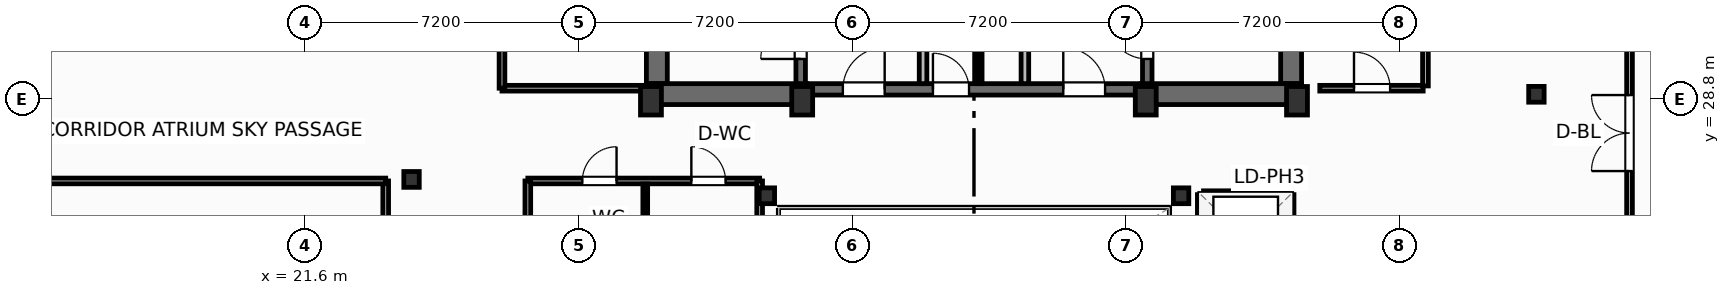
"""IFC4 building model, lengths in metres.
Left out: names, types, materials, properties, quantities, classifications, styles, units other than length and angle.
Written with IfcOpenShell. Run it as: python <this file> out.ifc"""

import sys

from ifc_helpers import new_model, si_unit, direction, frame, frame_2d, origin, origin_2d, place, context, subcontext, project, spatial, rectangle, i_section, extrude, element, fill, save


model = new_model("IFC4")
c1 = context("Model", 3, precision=1e-05, world=origin(), true_north=direction((0.0, 1.0)))
c2 = subcontext(c1, "Body", "Model", "MODEL_VIEW")
j1 = project(units=[si_unit("LENGTHUNIT", "METRE"), si_unit("PLANEANGLEUNIT", "RADIAN")], contexts=[c1])
p1 = place(None, origin())
s1 = spatial("IfcSite", under=j1, at=p1, CompositionType="ELEMENT")
p2 = place(p1, origin())
s2 = spatial("IfcBuilding", under=s1, at=p2, CompositionType="ELEMENT")
p3 = place(p2, frame((0.0, 0.0, 291.5)))
s3 = spatial("IfcBuildingStorey", under=s2, at=p3, CompositionType="ELEMENT", Elevation=291.5)
for number, where, z_axis, x_axis in (
    (1, (30.7, 28.75, 0.0), (0.0, 0.0, 1.0), (1.0, 0.0, 0.0)),
    (2, (34.68, 28.75, 0.0), (0.0, 0.0, 1.0), (1.0, 0.0, 0.0)),
    (3, (43.72, 28.75, 0.0), (0.0, 0.0, 1.0), (1.0, 0.0, 0.0)),
    (4, (47.7, 28.75, 0.0), (0.0, 0.0, 1.0), (1.0, 0.0, 0.0)),
):
    element("IfcColumn", number, at=place(p3, frame(where, z_axis=z_axis, x_axis=x_axis)), inside=s3, PredefinedType="COLUMN", context=c2, shape_type="SweptSolid", body=[
        extrude(rectangle(XDim=0.55, YDim=0.75, at=origin_2d()), origin(), (0.0, 0.0, 1.0), 4.8),
    ])
for number, where, z_axis, x_axis in (
    (5, (33.75, 26.25, 0.0), (0.0, 0.0, 1.0), (1.0, 0.0, 0.0)),
    (6, (44.65, 26.25, 0.0), (0.0, 0.0, 1.0), (1.0, 0.0, 0.0)),
    (7, (24.4, 26.68, 0.0), (0.0, 0.0, 1.0), (1.0, 0.0, 0.0)),
    (8, (54.0, 28.92, 0.0), (0.0, 0.0, 1.0), (1.0, 0.0, 0.0)),
):
    element("IfcColumn", number, at=place(p3, frame(where, z_axis=z_axis, x_axis=x_axis)), inside=s3, PredefinedType="COLUMN", context=c2, shape_type="SweptSolid", body=[
        extrude(i_section(OverallWidth=0.406, OverallDepth=0.416, WebThickness=0.03, FlangeThickness=0.048, FilletRadius=0.025, at=origin_2d()), origin(), (0.0, 0.0, 1.0), 4.8),
    ])
for number, where, z_axis, x_axis in (
    (9, (30.855, 29.2, 0.0), (0.0, 0.0, 1.0), (0.0, 1.0, 0.0)),
    (10, (47.545, 29.2, 0.0), (0.0, 0.0, 1.0), (0.0, 1.0, 0.0)),
):
    element("IfcWall", number, at=place(p3, frame(where, z_axis=z_axis, x_axis=x_axis)), inside=s3, PredefinedType="SHEAR", context=c2, shape_type="SweptSolid", body=[
        extrude(rectangle(XDim=9.22, YDim=0.55, at=frame_2d((4.61, 0.0))), origin(), (0.0, 0.0, 1.0), 4.48),
    ])
for number, where, z_axis, x_axis in (
    (11, (30.58, 28.925, 0.0), (0.0, 0.0, 1.0), (1.0, 0.0, 0.0)),
    (12, (43.6, 28.925, 0.0), (0.0, 0.0, 1.0), (1.0, 0.0, 0.0)),
):
    element("IfcWall", number, at=place(p3, frame(where, z_axis=z_axis, x_axis=x_axis)), inside=s3, PredefinedType="SHEAR", context=c2, shape_type="SweptSolid", body=[
        extrude(rectangle(XDim=4.22, YDim=0.55, at=frame_2d((2.11, 0.0))), origin(), (0.0, 0.0, 1.0), 4.48),
    ])
p4 = place(p3, frame((34.8, 29.05, 0.0), z_axis=(0.0, 0.0, 1.0), x_axis=(1.0, 0.0, 0.0)))
e13 = element("IfcWall", 13, at=p4, inside=s3, PredefinedType="SHEAR", context=c2, shape_type="SweptSolid", body=[
    extrude(rectangle(XDim=8.8, YDim=0.3, at=frame_2d((4.4, 0.0))), origin(), (0.0, 0.0, 1.0), 4.48),
])
p5 = place(p4, frame((0.95, 0.0, 0.0)))
e14 = element("IfcOpeningElement", 14, at=p5, cuts=e13, PredefinedType="OPENING", context=c2, shape_type="SweptSolid", body=[
    extrude(rectangle(XDim=1.1, YDim=2.15, at=frame_2d((0.55, 1.075))), frame((0.0, 0.16, 0.0), z_axis=(0.0, -1.0, 0.0), x_axis=(1.0, 0.0, 0.0)), (0.0, 0.0, 1.0), 0.32),
])
p6 = place(p4, frame((6.75, 0.0, 0.0)))
e15 = element("IfcOpeningElement", 15, at=p6, cuts=e13, PredefinedType="OPENING", context=c2, shape_type="SweptSolid", body=[
    extrude(rectangle(XDim=1.1, YDim=2.15, at=frame_2d((0.55, 1.075))), frame((0.0, 0.16, 0.0), z_axis=(0.0, -1.0, 0.0), x_axis=(1.0, 0.0, 0.0)), (0.0, 0.0, 1.0), 0.32),
])
p7 = place(p4, frame((3.32, 0.0, 0.0)))
e16 = element("IfcOpeningElement", 16, at=p7, cuts=e13, PredefinedType="OPENING", context=c2, shape_type="SweptSolid", body=[
    extrude(rectangle(XDim=0.95, YDim=2.15, at=frame_2d((0.475, 1.075))), frame((0.0, 0.16, 0.0), z_axis=(0.0, -1.0, 0.0), x_axis=(1.0, 0.0, 0.0)), (0.0, 0.0, 1.0), 0.32),
])
p8 = place(p3, frame((34.64, 29.2, 0.0), z_axis=(0.0, 0.0, 1.0), x_axis=(0.0, 1.0, 0.0)))
e17 = element("IfcWall", 17, at=p8, inside=s3, PredefinedType="SHEAR", context=c2, shape_type="SweptSolid", body=[
    extrude(rectangle(XDim=9.22, YDim=0.25, at=frame_2d((4.61, 0.0))), origin(), (0.0, 0.0, 1.0), 4.48),
])
p9 = place(p8, frame((0.65, 0.0, 0.0)))
e18 = element("IfcOpeningElement", 18, at=p9, cuts=e17, PredefinedType="OPENING", context=c2, shape_type="SweptSolid", body=[
    extrude(rectangle(XDim=1.05, YDim=2.15, at=frame_2d((0.525, 1.075))), frame((0.0, 0.135, 0.0), z_axis=(0.0, -1.0, 0.0), x_axis=(1.0, 0.0, 0.0)), (0.0, 0.0, 1.0), 0.27),
])
p10 = place(p3, frame((43.76, 29.2, 0.0), z_axis=(0.0, 0.0, 1.0), x_axis=(0.0, 1.0, 0.0)))
e19 = element("IfcWall", 19, at=p10, inside=s3, PredefinedType="SHEAR", context=c2, shape_type="SweptSolid", body=[
    extrude(rectangle(XDim=9.22, YDim=0.25, at=frame_2d((4.61, 0.0))), origin(), (0.0, 0.0, 1.0), 4.48),
])
p11 = place(p10, frame((0.65, 0.0, 0.0)))
e20 = element("IfcOpeningElement", 20, at=p11, cuts=e19, PredefinedType="OPENING", context=c2, shape_type="SweptSolid", body=[
    extrude(rectangle(XDim=1.05, YDim=2.15, at=frame_2d((0.525, 1.075))), frame((0.0, 0.135, 0.0), z_axis=(0.0, -1.0, 0.0), x_axis=(1.0, 0.0, 0.0)), (0.0, 0.0, 1.0), 0.27),
])
p12 = place(p3, frame((27.693, -7.489, 0.0), z_axis=(0.0, 0.0, 1.0), x_axis=(0.733009701217, 0.680218184057, 0.0)))
e21 = element("IfcWall", 21, at=p12, inside=s3, PredefinedType="SOLIDWALL", context=c2, shape_type="SweptSolid", body=[
    extrude(rectangle(XDim=66.428, YDim=0.22, at=frame_2d((33.214, 0.0))), origin(), (0.0, 0.0, 1.0), 2.265),
])
p13 = place(p12, frame((32.014, 0.0, 0.8)))
e22 = element("IfcOpeningElement", 22, at=p13, cuts=e21, PredefinedType="OPENING", context=c2, shape_type="SweptSolid", body=[
    extrude(rectangle(XDim=2.4, YDim=1.385, at=frame_2d((1.2, 0.692))), frame((0.0, 0.12, 0.0), z_axis=(0.0, -1.0, 0.0), x_axis=(1.0, 0.0, 0.0)), (0.0, 0.0, 1.0), 0.24),
])
p14 = place(p3, frame((50.695, 58.086, 0.0), z_axis=(0.0, 0.0, 1.0), x_axis=(-0.823531024939, -0.567271232272, 0.0)))
e23 = element("IfcWall", 23, at=p14, inside=s3, PredefinedType="SOLIDWALL", context=c2, shape_type="SweptSolid", body=[
    extrude(rectangle(XDim=56.157, YDim=0.22, at=frame_2d((28.079, 0.0))), origin(), (0.0, 0.0, 1.0), 3.76),
])
p15 = place(p14, frame((26.879, 0.0, 0.8)))
e24 = element("IfcOpeningElement", 24, at=p15, cuts=e23, PredefinedType="OPENING", context=c2, shape_type="SweptSolid", body=[
    extrude(rectangle(XDim=2.4, YDim=1.85, at=frame_2d((1.2, 0.925))), frame((0.0, 0.12, 0.0), z_axis=(0.0, -1.0, 0.0), x_axis=(1.0, 0.0, 0.0)), (0.0, 0.0, 1.0), 0.24),
])
p16 = place(p3, frame((27.46, 26.64, 0.0), z_axis=(0.0, 0.0, 1.0), x_axis=(1.0, 0.0, 0.0)))
e25 = element("IfcWall", 25, at=p16, inside=s3, PredefinedType="PARTITIONING", context=c2, shape_type="SweptSolid", body=[
    extrude(rectangle(XDim=6.1, YDim=0.15, at=frame_2d((3.05, 0.0))), origin(), (0.0, 0.0, 1.0), 3.692),
])
p17 = place(p16, frame((4.303, 0.0, 0.0)))
e26 = element("IfcOpeningElement", 26, at=p17, cuts=e25, PredefinedType="OPENING", context=c2, shape_type="SweptSolid", body=[
    extrude(rectangle(XDim=0.9, YDim=2.05, at=frame_2d((0.45, 1.025))), frame((0.0, 0.085, 0.0), z_axis=(0.0, -1.0, 0.0), x_axis=(1.0, 0.0, 0.0)), (0.0, 0.0, 1.0), 0.17),
])
p18 = place(p16, frame((1.435, 0.0, 0.0)))
e27 = element("IfcOpeningElement", 27, at=p18, cuts=e25, PredefinedType="OPENING", context=c2, shape_type="SweptSolid", body=[
    extrude(rectangle(XDim=0.9, YDim=2.05, at=frame_2d((0.45, 1.025))), frame((0.0, 0.085, 0.0), z_axis=(0.0, -1.0, 0.0), x_axis=(1.0, 0.0, 0.0)), (0.0, 0.0, 1.0), 0.17),
])
p19 = place(p3, frame((30.55, 19.38, 0.0), z_axis=(0.0, 0.0, 1.0), x_axis=(0.0, 1.0, 0.0)))
e28 = element("IfcWall", 28, at=p19, inside=s3, PredefinedType="PARTITIONING", context=c2, shape_type="SweptSolid", body=[
    extrude(rectangle(XDim=7.18, YDim=0.125, at=frame_2d((3.59, 0.0))), origin(), (0.0, 0.0, 1.0), 4.48),
])
p20 = place(p3, frame((27.46, 19.3, 0.0), z_axis=(0.0, 0.0, 1.0), x_axis=(0.0, 1.0, 0.0)))
e29 = element("IfcWall", 29, at=p20, inside=s3, PredefinedType="PARTITIONING", context=c2, shape_type="SweptSolid", body=[
    extrude(rectangle(XDim=7.34, YDim=0.15, at=frame_2d((3.67, 0.0))), origin(), (0.0, 0.0, 1.0), 4.48),
])
p21 = place(p3, frame((33.56, 19.3, 0.0), z_axis=(0.0, 0.0, 1.0), x_axis=(0.0, 1.0, 0.0)))
e30 = element("IfcWall", 30, at=p21, inside=s3, PredefinedType="PARTITIONING", context=c2, shape_type="SweptSolid", body=[
    extrude(rectangle(XDim=7.34, YDim=0.15, at=frame_2d((3.67, 0.0))), origin(), (0.0, 0.0, 1.0), 2.265),
])
p22 = place(p3, frame((56.45, 19.3, 0.0), z_axis=(0.0, 0.0, 1.0), x_axis=(0.0, 1.0, 0.0)))
e31 = element("IfcWall", 31, at=p22, inside=s3, PredefinedType="PARTITIONING", context=c2, shape_type="SweptSolid", body=[
    extrude(rectangle(XDim=32.7, YDim=0.15, at=frame_2d((16.35, 0.0))), origin(), (0.0, 0.0, 1.0), 2.265),
])
p23 = place(p22, frame((7.6, 0.0, 0.0)))
e32 = element("IfcOpeningElement", 32, at=p23, cuts=e31, PredefinedType="OPENING", context=c2, shape_type="SweptSolid", body=[
    extrude(rectangle(XDim=2.0, YDim=2.05, at=frame_2d((1.0, 1.025))), frame((0.0, 0.085, 0.0), z_axis=(0.0, -1.0, 0.0), x_axis=(1.0, 0.0, 0.0)), (0.0, 0.0, 1.0), 0.17),
])
p24 = place(p3, frame((23.72, 19.3, 0.0), z_axis=(0.0, 0.0, 1.0), x_axis=(0.0, 1.0, 0.0)))
e33 = element("IfcWall", 33, at=p24, inside=s3, PredefinedType="PARTITIONING", context=c2, shape_type="SweptSolid", body=[
    extrude(rectangle(XDim=7.34, YDim=0.15, at=frame_2d((3.67, 0.0))), origin(), (0.0, 0.0, 1.0), 4.48),
])
p25 = place(p3, frame((5.078, 26.64, 0.0), z_axis=(0.0, 0.0, 1.0), x_axis=(1.0, 0.0, 0.0)))
e34 = element("IfcWall", 34, at=p25, inside=s3, PredefinedType="PARTITIONING", context=c2, shape_type="SweptSolid", body=[
    extrude(rectangle(XDim=18.642, YDim=0.15, at=frame_2d((9.321, 0.0))), origin(), (0.0, 0.0, 1.0), 2.265),
])
for number, where, z_axis, x_axis in (
    (35, (37.86, 29.2, 0.0), (0.0, 0.0, 1.0), (0.0, 1.0, 0.0)),
    (36, (40.54, 29.2, 0.0), (0.0, 0.0, 1.0), (0.0, 1.0, 0.0)),
):
    element("IfcWall", number, at=place(p3, frame(where, z_axis=z_axis, x_axis=x_axis)), inside=s3, PredefinedType="PARTITIONING", context=c2, shape_type="SweptSolid", body=[
        extrude(rectangle(XDim=5.18, YDim=0.2, at=frame_2d((2.59, 0.0))), origin(), (0.0, 0.0, 1.0), 4.48),
    ])
p26 = place(p3, frame((39.35, 29.2, 0.0), z_axis=(0.0, 0.0, 1.0), x_axis=(0.0, 1.0, 0.0)))
e37 = element("IfcWall", 37, at=p26, inside=s3, PredefinedType="PARTITIONING", context=c2, shape_type="SweptSolid", body=[
    extrude(rectangle(XDim=5.22, YDim=0.125, at=frame_2d((2.61, 0.0))), origin(), (0.0, 0.0, 1.0), 4.48),
])
p27 = place(p26, frame((2.05, 0.0, 0.0)))
e38 = element("IfcOpeningElement", 38, at=p27, cuts=e37, PredefinedType="OPENING", context=c2, shape_type="SweptSolid", body=[
    extrude(rectangle(XDim=0.85, YDim=2.05, at=frame_2d((0.425, 1.025))), frame((0.0, 0.073, 0.0), z_axis=(0.0, -1.0, 0.0), x_axis=(1.0, 0.0, 0.0)), (0.0, 0.0, 1.0), 0.145),
])
p28 = place(p3, frame((26.78, 29.08, 0.0), z_axis=(0.0, 0.0, 1.0), x_axis=(1.0, 0.0, 0.0)))
e39 = element("IfcWall", 39, at=p28, inside=s3, PredefinedType="PARTITIONING", context=c2, shape_type="SweptSolid", body=[
    extrude(rectangle(XDim=3.8, YDim=0.15, at=frame_2d((1.9, 0.0))), origin(), (0.0, 0.0, 1.0), 4.48),
])
p29 = place(p3, frame((26.78, 29.08, 0.0), z_axis=(0.0, 0.0, 1.0), x_axis=(0.0, 1.0, 0.0)))
e40 = element("IfcWall", 40, at=p29, inside=s3, PredefinedType="PARTITIONING", context=c2, shape_type="SweptSolid", body=[
    extrude(rectangle(XDim=9.18, YDim=0.15, at=frame_2d((4.59, 0.0))), origin(), (0.0, 0.0, 1.0), 4.48),
])
p30 = place(p29, frame((2.4, 0.0, 0.0)))
e41 = element("IfcOpeningElement", 41, at=p30, cuts=e40, PredefinedType="OPENING", context=c2, shape_type="SweptSolid", body=[
    extrude(rectangle(XDim=0.95, YDim=2.05, at=frame_2d((0.475, 1.025))), frame((0.0, 0.085, 0.0), z_axis=(0.0, -1.0, 0.0), x_axis=(1.0, 0.0, 0.0)), (0.0, 0.0, 1.0), 0.17),
])
p31 = place(p3, frame((48.3, 29.08, 0.0), z_axis=(0.0, 0.0, 1.0), x_axis=(1.0, 0.0, 0.0)))
e42 = element("IfcWall", 42, at=p31, inside=s3, PredefinedType="PARTITIONING", context=c2, shape_type="SweptSolid", body=[
    extrude(rectangle(XDim=2.72, YDim=0.15, at=frame_2d((1.36, 0.0))), origin(), (0.0, 0.0, 1.0), 3.692),
])
p32 = place(p31, frame((0.9, 0.0, 0.0)))
e43 = element("IfcOpeningElement", 43, at=p32, cuts=e42, PredefinedType="OPENING", context=c2, shape_type="SweptSolid", body=[
    extrude(rectangle(XDim=0.95, YDim=2.05, at=frame_2d((0.475, 1.025))), frame((0.0, 0.085, 0.0), z_axis=(0.0, -1.0, 0.0), x_axis=(1.0, 0.0, 0.0)), (0.0, 0.0, 1.0), 0.17),
])
p33 = place(p3, frame((51.08, 29.14, 0.0), z_axis=(0.0, 0.0, 1.0), x_axis=(0.0, 1.0, 0.0)))
e44 = element("IfcWall", 44, at=p33, inside=s3, PredefinedType="PARTITIONING", context=c2, shape_type="SweptSolid", body=[
    extrude(rectangle(XDim=6.76, YDim=0.15, at=frame_2d((3.38, 0.0))), origin(), (0.0, 0.0, 1.0), 4.48),
])
p34 = place(p3, frame((45.24, 26.28, 0.0), z_axis=(0.0, 0.0, 1.0), x_axis=(1.0, 0.0, 0.0)))
e45 = element("IfcWall", 45, at=p34, inside=s3, PredefinedType="PARTITIONING", context=c2, shape_type="SweptSolid", body=[
    extrude(rectangle(XDim=2.22, YDim=0.2, at=frame_2d((1.11, 0.0))), origin(), (0.0, 0.0, 1.0), 4.48),
])
p35 = place(p3, frame((45.18, 19.38, 0.0), z_axis=(0.0, 0.0, 1.0), x_axis=(0.0, 1.0, 0.0)))
e46 = element("IfcWall", 46, at=p35, inside=s3, PredefinedType="PARTITIONING", context=c2, shape_type="SweptSolid", body=[
    extrude(rectangle(XDim=6.9, YDim=0.2, at=frame_2d((3.45, 0.0))), origin(), (0.0, 0.0, 1.0), 4.48),
])
p36 = place(p3, frame((47.52, 19.38, 0.0), z_axis=(0.0, 0.0, 1.0), x_axis=(0.0, 1.0, 0.0)))
e47 = element("IfcWall", 47, at=p36, inside=s3, PredefinedType="PARTITIONING", context=c2, shape_type="SweptSolid", body=[
    extrude(rectangle(XDim=6.9, YDim=0.2, at=frame_2d((3.45, 0.0))), origin(), (0.0, 0.0, 1.0), 4.48),
])
p37 = place(p36, frame((0.59, 0.0, 0.0)))
e48 = element("IfcOpeningElement", 48, at=p37, cuts=e47, PredefinedType="OPENING", context=c2, shape_type="SweptSolid", body=[
    extrude(rectangle(XDim=1.1, YDim=2.15, at=frame_2d((0.55, 1.075))), frame((0.0, 0.11, 0.0), z_axis=(0.0, -1.0, 0.0), x_axis=(1.0, 0.0, 0.0)), (0.0, 0.0, 1.0), 0.22),
])
p38 = place(p36, frame((2.89, 0.0, 0.0)))
e49 = element("IfcOpeningElement", 49, at=p38, cuts=e47, PredefinedType="OPENING", context=c2, shape_type="SweptSolid", body=[
    extrude(rectangle(XDim=1.1, YDim=2.15, at=frame_2d((0.55, 1.075))), frame((0.0, 0.11, 0.0), z_axis=(0.0, -1.0, 0.0), x_axis=(1.0, 0.0, 0.0)), (0.0, 0.0, 1.0), 0.22),
])
p39 = place(p36, frame((5.19, 0.0, 0.0)))
e50 = element("IfcOpeningElement", 50, at=p39, cuts=e47, PredefinedType="OPENING", context=c2, shape_type="SweptSolid", body=[
    extrude(rectangle(XDim=1.1, YDim=2.15, at=frame_2d((0.55, 1.075))), frame((0.0, 0.11, 0.0), z_axis=(0.0, -1.0, 0.0), x_axis=(1.0, 0.0, 0.0)), (0.0, 0.0, 1.0), 0.22),
])
p40 = place(p17, origin())
e51 = element("IfcDoor", 51, at=p40, inside=s3, OperationType="SINGLE_SWING_LEFT", PredefinedType="DOOR", context=c2, shape_type="SweptSolid", body=[
    extrude(rectangle(XDim=0.9, YDim=2.05, at=frame_2d((0.45, 1.025))), frame((0.0, 0.025, 0.0), z_axis=(0.0, -1.0, 0.0), x_axis=(1.0, 0.0, 0.0)), (0.0, 0.0, 1.0), 0.05),
])
fill(e26, e51)
p41 = place(p18, origin())
e52 = element("IfcDoor", 52, at=p41, inside=s3, OperationType="SINGLE_SWING_RIGHT", PredefinedType="DOOR", context=c2, shape_type="SweptSolid", body=[
    extrude(rectangle(XDim=0.9, YDim=2.05, at=frame_2d((0.45, 1.025))), frame((0.0, 0.025, 0.0), z_axis=(0.0, -1.0, 0.0), x_axis=(1.0, 0.0, 0.0)), (0.0, 0.0, 1.0), 0.05),
])
fill(e27, e52)
p42 = place(p23, origin())
e53 = element("IfcDoor", 53, at=p42, inside=s3, OperationType="DOUBLE_DOOR_SINGLE_SWING", PredefinedType="DOOR", context=c2, shape_type="SweptSolid", body=[
    extrude(rectangle(XDim=2.0, YDim=2.05, at=frame_2d((1.0, 1.025))), frame((0.0, 0.025, 0.0), z_axis=(0.0, -1.0, 0.0), x_axis=(1.0, 0.0, 0.0)), (0.0, 0.0, 1.0), 0.05),
])
fill(e32, e53)
p43 = place(p9, origin())
e54 = element("IfcDoor", 54, at=p43, inside=s3, OperationType="SINGLE_SWING_LEFT", PredefinedType="DOOR", context=c2, shape_type="SweptSolid", body=[
    extrude(rectangle(XDim=1.05, YDim=2.15, at=frame_2d((0.525, 1.075))), frame((0.0, 0.025, 0.0), z_axis=(0.0, -1.0, 0.0), x_axis=(1.0, 0.0, 0.0)), (0.0, 0.0, 1.0), 0.05),
])
fill(e18, e54)
p44 = place(p11, origin())
e55 = element("IfcDoor", 55, at=p44, inside=s3, OperationType="SINGLE_SWING_RIGHT", PredefinedType="DOOR", context=c2, shape_type="SweptSolid", body=[
    extrude(rectangle(XDim=1.05, YDim=2.15, at=frame_2d((0.525, 1.075))), frame((0.0, 0.025, 0.0), z_axis=(0.0, -1.0, 0.0), x_axis=(1.0, 0.0, 0.0)), (0.0, 0.0, 1.0), 0.05),
])
fill(e20, e55)
p45 = place(p5, origin())
e56 = element("IfcDoor", 56, at=p45, inside=s3, OperationType="SINGLE_SWING_RIGHT", PredefinedType="DOOR", context=c2, shape_type="SweptSolid", body=[
    extrude(rectangle(XDim=1.1, YDim=2.15, at=frame_2d((0.55, 1.075))), frame((0.0, 0.025, 0.0), z_axis=(0.0, -1.0, 0.0), x_axis=(1.0, 0.0, 0.0)), (0.0, 0.0, 1.0), 0.05),
])
fill(e14, e56)
p46 = place(p6, origin())
e57 = element("IfcDoor", 57, at=p46, inside=s3, OperationType="SINGLE_SWING_LEFT", PredefinedType="DOOR", context=c2, shape_type="SweptSolid", body=[
    extrude(rectangle(XDim=1.1, YDim=2.15, at=frame_2d((0.55, 1.075))), frame((0.0, 0.025, 0.0), z_axis=(0.0, -1.0, 0.0), x_axis=(1.0, 0.0, 0.0)), (0.0, 0.0, 1.0), 0.05),
])
fill(e15, e57)
p47 = place(p7, origin())
e58 = element("IfcDoor", 58, at=p47, inside=s3, OperationType="SINGLE_SWING_LEFT", PredefinedType="DOOR", context=c2, shape_type="SweptSolid", body=[
    extrude(rectangle(XDim=0.95, YDim=2.15, at=frame_2d((0.475, 1.075))), frame((0.0, 0.025, 0.0), z_axis=(0.0, -1.0, 0.0), x_axis=(1.0, 0.0, 0.0)), (0.0, 0.0, 1.0), 0.05),
])
fill(e16, e58)
p48 = place(p32, origin())
e59 = element("IfcDoor", 59, at=p48, inside=s3, OperationType="SINGLE_SWING_LEFT", PredefinedType="DOOR", context=c2, shape_type="SweptSolid", body=[
    extrude(rectangle(XDim=0.95, YDim=2.05, at=frame_2d((0.475, 1.025))), frame((0.0, 0.025, 0.0), z_axis=(0.0, -1.0, 0.0), x_axis=(1.0, 0.0, 0.0)), (0.0, 0.0, 1.0), 0.05),
])
fill(e43, e59)
save(model, sys.argv[1])
